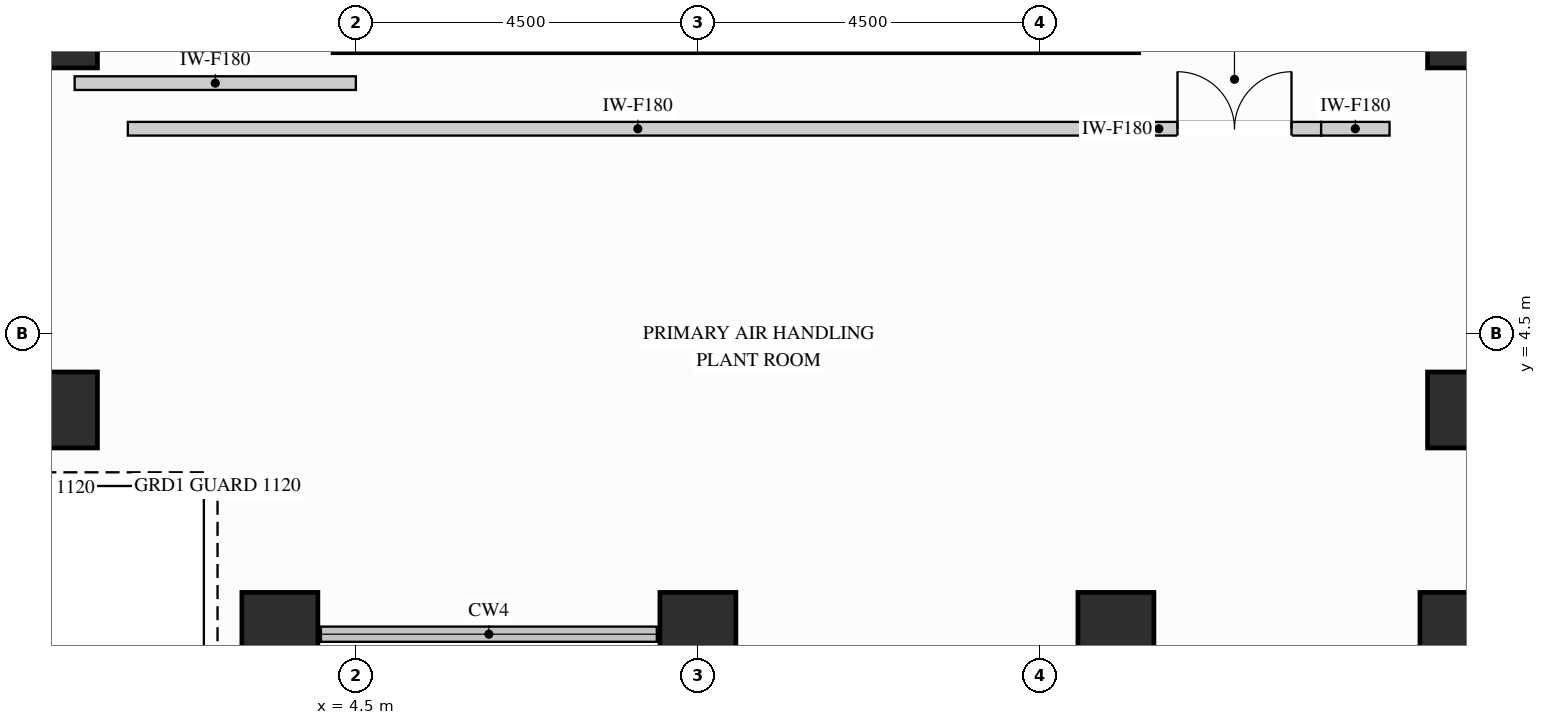
"""IFC4 building model, lengths in metres.
Left out: names, types, materials, properties, quantities, classifications, styles, units other than length and angle.
Written with IfcOpenShell. Run it as: python <this file> out.ifc"""

import sys

from ifc_helpers import new_model, si_unit, direction, frame, frame_2d, origin, origin_2d, place, context, subcontext, project, spatial, rectangle, extrude, source, transform, mapped, element, fill, save


model = new_model("IFC4")
c1 = context("Model", 3, precision=1e-05, world=origin(), true_north=direction((0.0, 1.0)))
c2 = subcontext(c1, "Body", "Model", "MODEL_VIEW")
j1 = project(units=[si_unit("LENGTHUNIT", "METRE"), si_unit("PLANEANGLEUNIT", "RADIAN")], contexts=[c1])
p1 = place(None, origin())
s1 = spatial("IfcSite", under=j1, at=p1, CompositionType="ELEMENT")
p2 = place(p1, origin())
s2 = spatial("IfcBuilding", under=s1, at=p2, CompositionType="ELEMENT")
p3 = place(p2, frame((0.0, 0.0, 207.9)))
s3 = spatial("IfcBuildingStorey", under=s2, at=p3, CompositionType="ELEMENT", Elevation=207.9)
m1 = source(origin(), c2, "Body", "SweptSolid", [
    extrude(rectangle(XDim=0.8, YDim=1.0, at=origin_2d()), origin(), (0.0, 0.0, 1.0), 4.26),
])
for number, where, z_axis, x_axis in (
    (1, (19.0, 3.5, 0.0), (0.0, 0.0, 1.0), (1.0, 0.0, 0.0)),
    (2, (19.0, 8.5, 0.0), (0.0, 0.0, 1.0), (1.0, 0.0, 0.0)),
):
    element("IfcColumn", number, at=place(p3, frame(where, z_axis=z_axis, x_axis=x_axis)), inside=s3, PredefinedType="COLUMN", context=c2, shape_type="MappedRepresentation", body=[
        mapped(m1, transform((0.0, 0.0, 0.0), x_axis=(1.0, 0.0, 0.0), y_axis=(0.0, 1.0, 0.0), z_axis=(0.0, 0.0, 1.0))),
    ])
m2 = source(origin(), c2, "Body", "SweptSolid", [
    extrude(rectangle(XDim=1.0, YDim=1.0, at=origin_2d()), origin(), (0.0, 0.0, 1.0), 4.26),
])
for number, where, z_axis, x_axis in (
    (3, (14.5, 0.6, 0.0), (0.0, 0.0, 1.0), (1.0, 0.0, 0.0)),
    (4, (19.0, 0.6, 0.0), (0.0, 0.0, 1.0), (1.0, 0.0, 0.0)),
    (5, (3.5, 0.6, 0.0), (0.0, 0.0, 1.0), (1.0, 0.0, 0.0)),
    (6, (9.0, 0.6, 0.0), (0.0, 0.0, 1.0), (1.0, 0.0, 0.0)),
    (7, (0.6, 3.5, 0.0), (0.0, 0.0, 1.0), (1.0, 0.0, 0.0)),
    (8, (0.6, 8.5, 0.0), (0.0, 0.0, 1.0), (1.0, 0.0, 0.0)),
):
    element("IfcColumn", number, at=place(p3, frame(where, z_axis=z_axis, x_axis=x_axis)), inside=s3, PredefinedType="COLUMN", context=c2, shape_type="MappedRepresentation", body=[
        mapped(m2, transform((0.0, 0.0, 0.0), x_axis=(1.0, 0.0, 0.0), y_axis=(0.0, 1.0, 0.0), z_axis=(0.0, 0.0, 1.0))),
    ])
p4 = place(p3, frame((14.92, 7.2, 0.0), z_axis=(0.0, 0.0, 1.0), x_axis=(1.0, 0.0, 0.0)))
e9 = element("IfcWall", 9, at=p4, inside=s3, PredefinedType="PARTITIONING", context=c2, shape_type="SweptSolid", body=[
    extrude(rectangle(XDim=2.28, YDim=0.18, at=frame_2d((1.14, 0.0))), origin(), (0.0, 0.0, 1.0), 4.245),
])
p5 = place(p4, frame((0.39, 0.0, 0.0)))
e10 = element("IfcOpeningElement", 10, at=p5, cuts=e9, PredefinedType="OPENING", context=c2, shape_type="SweptSolid", body=[
    extrude(rectangle(XDim=1.5, YDim=2.2, at=frame_2d((0.75, 1.1))), frame((0.0, 0.1, 0.0), z_axis=(0.0, -1.0, 0.0), x_axis=(1.0, 0.0, 0.0)), (0.0, 0.0, 1.0), 0.2),
])
m3 = source(origin(), c2, "Body", "SweptSolid", [
    extrude(rectangle(XDim=13.42, YDim=0.18, at=frame_2d((6.71, 0.0))), origin(), (0.0, 0.0, 1.0), 4.245),
])
p6 = place(p3, frame((1.5, 7.2, 0.0), z_axis=(0.0, 0.0, 1.0), x_axis=(1.0, 0.0, 0.0)))
e11 = element("IfcWall", 11, at=p6, inside=s3, PredefinedType="PARTITIONING", context=c2, shape_type="MappedRepresentation", body=[
    mapped(m3, transform((0.0, 0.0, 0.0), x_axis=(1.0, 0.0, 0.0), y_axis=(0.0, 1.0, 0.0), z_axis=(0.0, 0.0, 1.0))),
])
m4 = source(origin(), c2, "Body", "SweptSolid", [
    extrude(rectangle(XDim=0.9, YDim=0.18, at=frame_2d((0.45, 0.0))), origin(), (0.0, 0.0, 1.0), 4.245),
])
p7 = place(p3, frame((17.2, 7.2, 0.0), z_axis=(0.0, 0.0, 1.0), x_axis=(1.0, 0.0, 0.0)))
e12 = element("IfcWall", 12, at=p7, inside=s3, PredefinedType="PARTITIONING", context=c2, shape_type="MappedRepresentation", body=[
    mapped(m4, transform((0.0, 0.0, 0.0), x_axis=(1.0, 0.0, 0.0), y_axis=(0.0, 1.0, 0.0), z_axis=(0.0, 0.0, 1.0))),
])
m5 = source(origin(), c2, "Body", "SweptSolid", [
    extrude(rectangle(XDim=3.7, YDim=0.18, at=frame_2d((1.85, 0.0))), origin(), (0.0, 0.0, 1.0), 3.708),
])
p8 = place(p3, frame((0.8, 7.8, 0.0), z_axis=(0.0, 0.0, 1.0), x_axis=(1.0, 0.0, 0.0)))
e13 = element("IfcWall", 13, at=p8, inside=s3, PredefinedType="PARTITIONING", context=c2, shape_type="MappedRepresentation", body=[
    mapped(m5, transform((0.0, 0.0, 0.0), x_axis=(1.0, 0.0, 0.0), y_axis=(0.0, 1.0, 0.0), z_axis=(0.0, 0.0, 1.0))),
])
m6 = source(origin(), c2, "Body", "SweptSolid", [
    extrude(rectangle(XDim=1.5, YDim=2.2, at=frame_2d((0.75, 1.1))), frame((0.0, 0.025, 0.0), z_axis=(0.0, -1.0, 0.0), x_axis=(1.0, 0.0, 0.0)), (0.0, 0.0, 1.0), 0.05),
])
p9 = place(p5, origin())
e14 = element("IfcDoor", 14, at=p9, inside=s3, OperationType="DOUBLE_DOOR_SINGLE_SWING", PredefinedType="DOOR", context=c2, shape_type="MappedRepresentation", body=[
    mapped(m6, transform((0.0, 0.0, 0.0), x_axis=(1.0, 0.0, 0.0), y_axis=(0.0, 1.0, 0.0), z_axis=(0.0, 0.0, 1.0))),
])
fill(e10, e14)
save(model, sys.argv[1])
